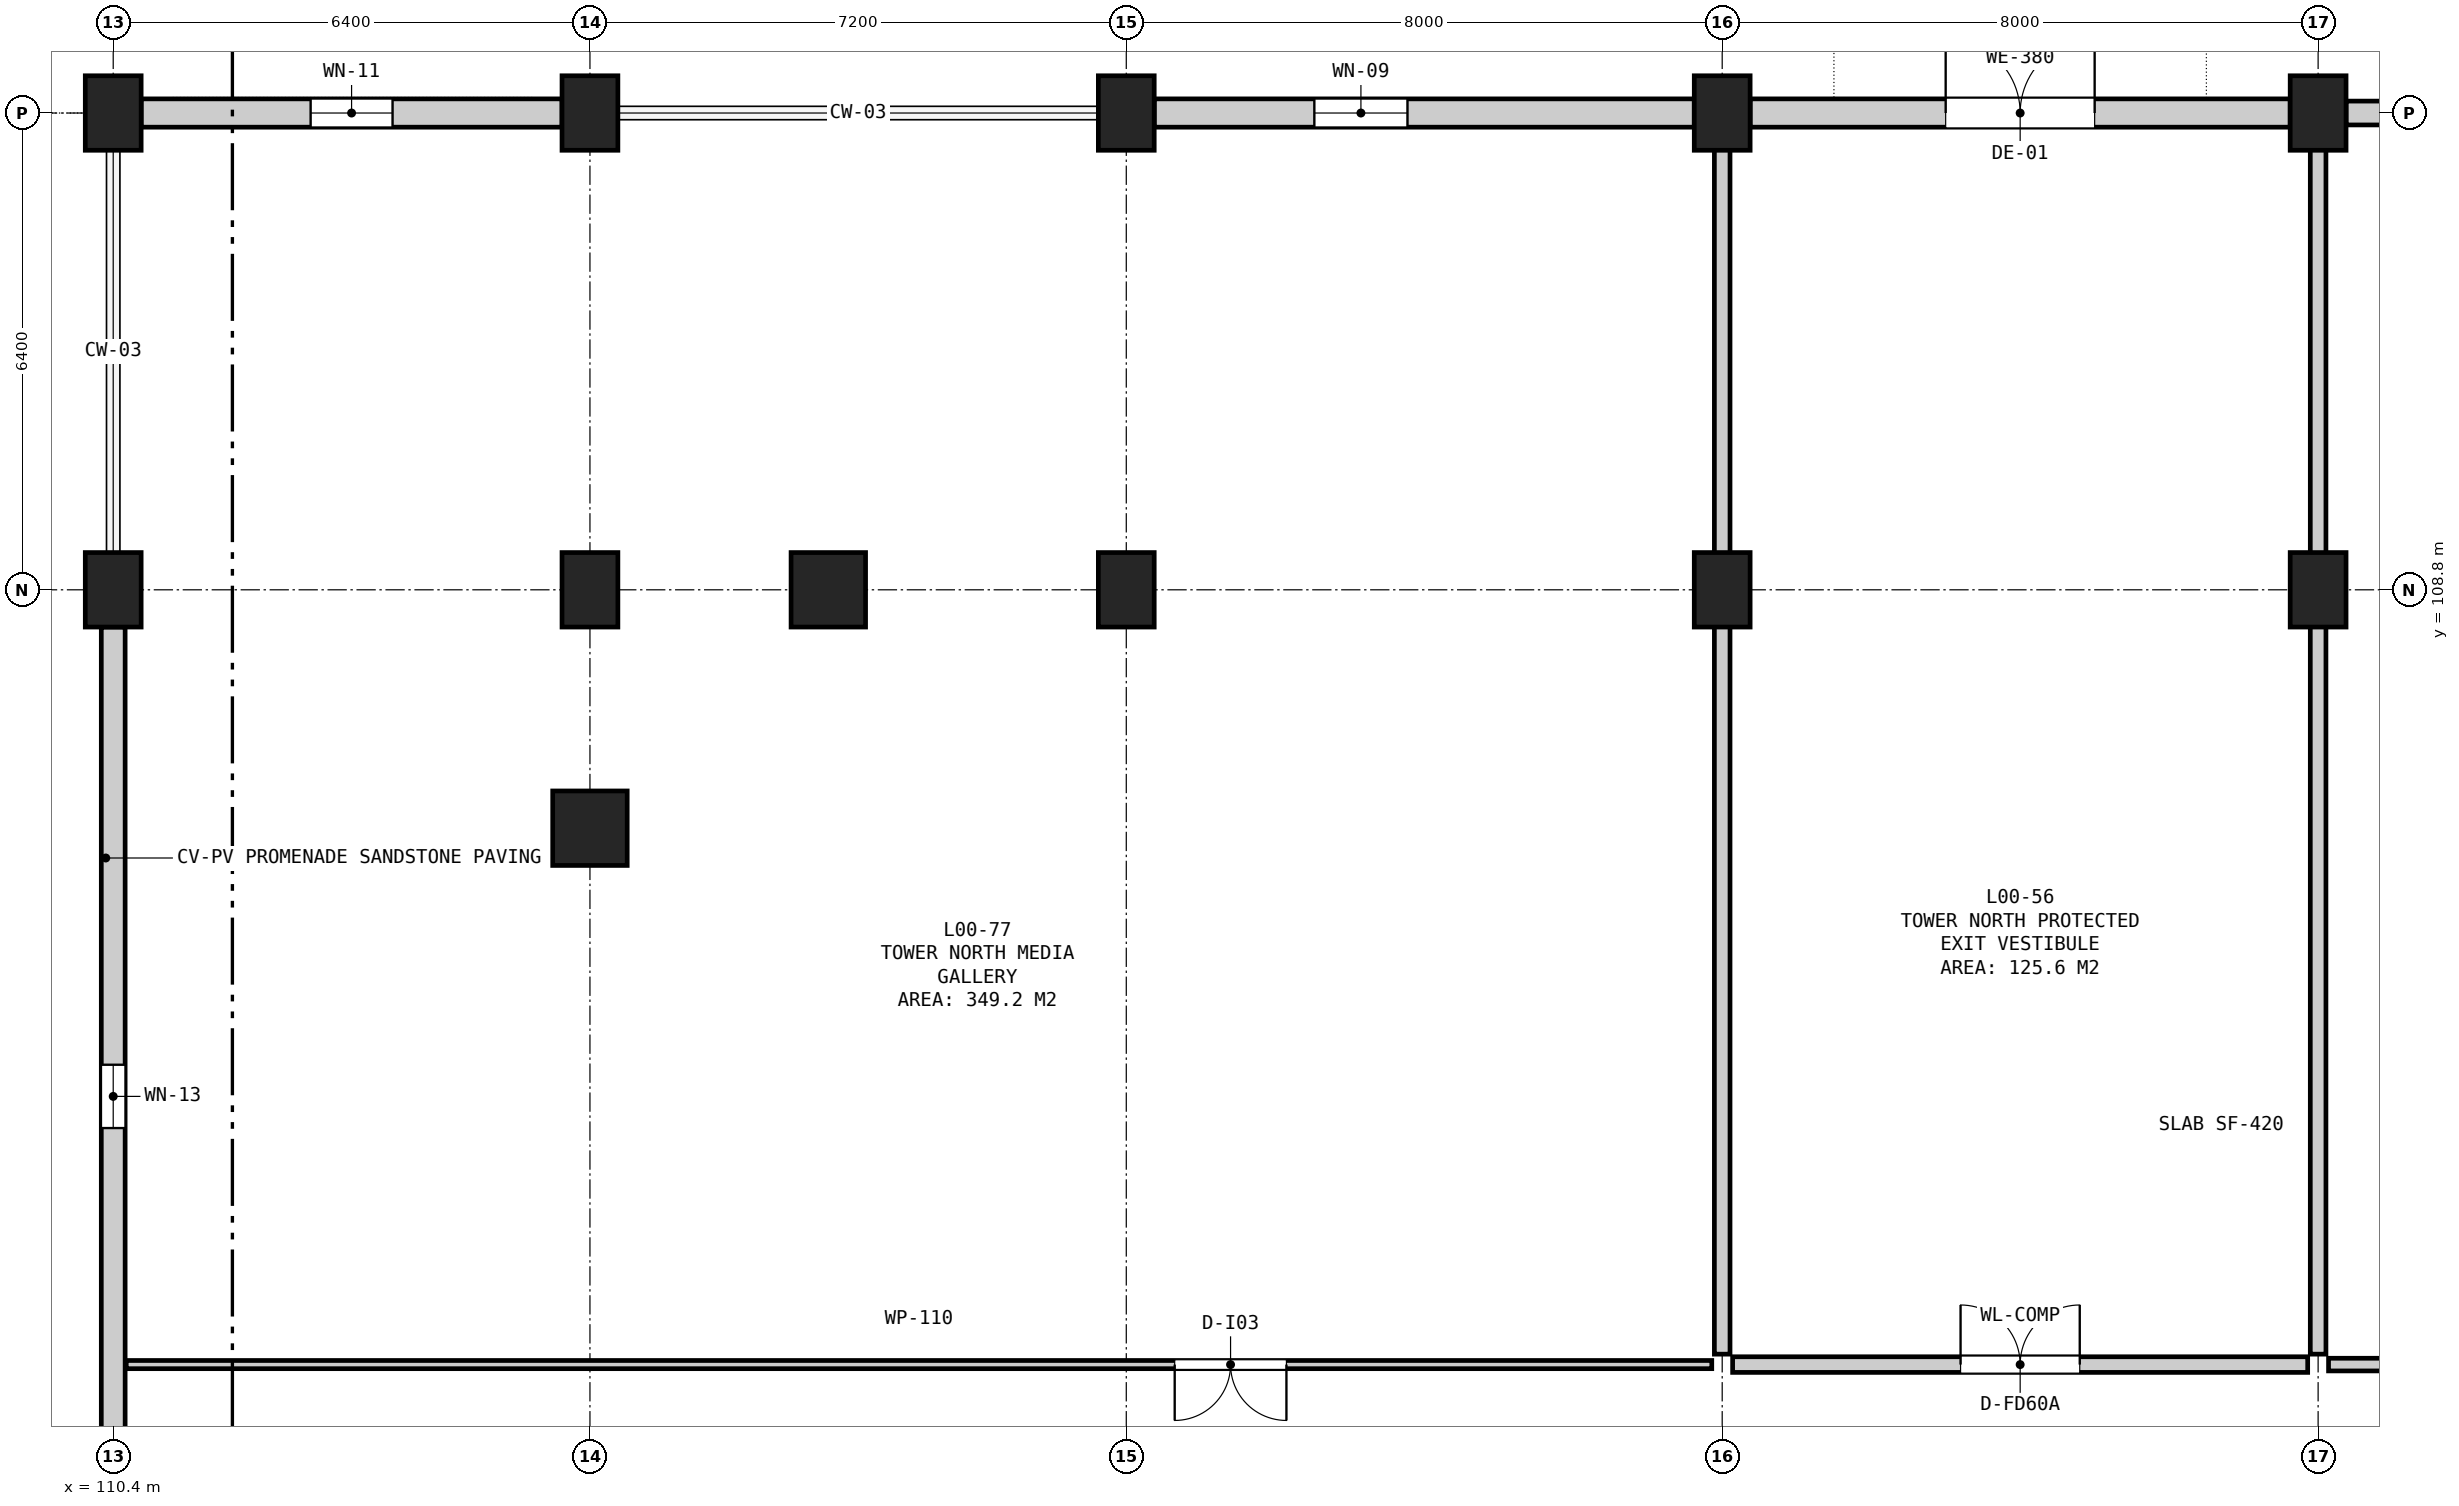
"""IFC4 building model, lengths in metres.
Left out: names, types, materials, properties, quantities, classifications, styles, units other than length and angle.
Written with IfcOpenShell. Run it as: python <this file> out.ifc"""

import sys

from ifc_helpers import new_model, si_unit, direction, frame, frame_2d, origin, origin_2d, place, context, subcontext, project, spatial, rectangle, circle, extrude, element, fill, save


model = new_model("IFC4")
c1 = context("Model", 3, precision=1e-05, world=origin(), true_north=direction((0.0, 1.0)))
c2 = subcontext(c1, "Body", "Model", "MODEL_VIEW")
j1 = project(units=[si_unit("LENGTHUNIT", "METRE"), si_unit("PLANEANGLEUNIT", "RADIAN")], contexts=[c1])
p1 = place(None, origin())
s1 = spatial("IfcSite", under=j1, at=p1, CompositionType="ELEMENT")
p2 = place(p1, origin())
s2 = spatial("IfcBuilding", under=s1, at=p2, CompositionType="ELEMENT")
p3 = place(p2, origin())
s3 = spatial("IfcBuildingStorey", under=s2, at=p3, CompositionType="ELEMENT", Elevation=0.0)
for number, where, z_axis, x_axis in (
    (1, (110.4, 108.8, 0.0), (0.0, 0.0, 1.0), (1.0, 0.0, 0.0)),
    (2, (110.4, 115.2, 0.0), (0.0, 0.0, 1.0), (1.0, 0.0, 0.0)),
):
    element("IfcColumn", number, at=place(p3, frame(where, z_axis=z_axis, x_axis=x_axis)), inside=s3, PredefinedType="COLUMN", context=c2, shape_type="SweptSolid", body=[
        extrude(rectangle(XDim=0.75, YDim=1.0, at=origin_2d()), origin(), (0.0, 0.0, 1.0), 5.4),
    ])
p4 = place(p3, frame((116.8, 105.6, 0.0), z_axis=(0.0, 0.0, 1.0), x_axis=(1.0, 0.0, 0.0)))
e3 = element("IfcColumn", 3, at=p4, inside=s3, PredefinedType="COLUMN", context=c2, shape_type="SweptSolid", body=[
    extrude(circle(Radius=0.5, at=origin_2d()), origin(), (0.0, 0.0, 1.0), 5.4),
])
for number, where, z_axis, x_axis in (
    (4, (116.8, 108.8, 0.0), (0.0, 0.0, 1.0), (1.0, 0.0, 0.0)),
    (5, (116.8, 115.2, 0.0), (0.0, 0.0, 1.0), (1.0, 0.0, 0.0)),
):
    element("IfcColumn", number, at=place(p3, frame(where, z_axis=z_axis, x_axis=x_axis)), inside=s3, PredefinedType="COLUMN", context=c2, shape_type="SweptSolid", body=[
        extrude(rectangle(XDim=0.75, YDim=1.0, at=origin_2d()), origin(), (0.0, 0.0, 1.0), 5.4),
    ])
p5 = place(p3, frame((120.0, 108.8, 0.0), z_axis=(0.0, 0.0, 1.0), x_axis=(1.0, 0.0, 0.0)))
e6 = element("IfcColumn", 6, at=p5, inside=s3, PredefinedType="COLUMN", context=c2, shape_type="SweptSolid", body=[
    extrude(circle(Radius=0.5, at=origin_2d()), origin(), (0.0, 0.0, 1.0), 5.4),
])
for number, where, z_axis, x_axis in (
    (7, (124.0, 108.8, 0.0), (0.0, 0.0, 1.0), (1.0, 0.0, 0.0)),
    (8, (124.0, 115.2, 0.0), (0.0, 0.0, 1.0), (1.0, 0.0, 0.0)),
    (9, (132.0, 108.8, 0.0), (0.0, 0.0, 1.0), (1.0, 0.0, 0.0)),
    (10, (132.0, 115.2, 0.0), (0.0, 0.0, 1.0), (1.0, 0.0, 0.0)),
    (11, (140.0, 108.8, 0.0), (0.0, 0.0, 1.0), (1.0, 0.0, 0.0)),
    (12, (140.0, 115.2, 0.0), (0.0, 0.0, 1.0), (1.0, 0.0, 0.0)),
):
    element("IfcColumn", number, at=place(p3, frame(where, z_axis=z_axis, x_axis=x_axis)), inside=s3, PredefinedType="COLUMN", context=c2, shape_type="SweptSolid", body=[
        extrude(rectangle(XDim=0.75, YDim=1.0, at=origin_2d()), origin(), (0.0, 0.0, 1.0), 5.4),
    ])
p6 = place(p3, frame((147.625, 115.2, 0.0), z_axis=(0.0, 0.0, 1.0), x_axis=(-1.0, 0.0, 0.0)))
e13 = element("IfcWall", 13, at=p6, inside=s3, PredefinedType="SOLIDWALL", context=c2, shape_type="SweptSolid", body=[
    extrude(rectangle(XDim=7.25, YDim=0.32, at=frame_2d((3.625, 0.0))), origin(), (0.0, 0.0, 1.0), 4.48),
])
p7 = place(p6, frame((3.775, 0.0, 0.9)))
e14 = element("IfcOpeningElement", 14, at=p7, cuts=e13, PredefinedType="OPENING", context=c2, shape_type="SweptSolid", body=[
    extrude(rectangle(XDim=1.4, YDim=1.8, at=frame_2d((0.7, 0.9))), frame((0.0, 0.172, 0.0), z_axis=(0.0, -1.0, 0.0), x_axis=(1.0, 0.0, 0.0)), (0.0, 0.0, 1.0), 0.344),
])
p8 = place(p3, frame((139.625, 115.2, 0.0), z_axis=(0.0, 0.0, 1.0), x_axis=(-1.0, 0.0, 0.0)))
e15 = element("IfcWall", 15, at=p8, inside=s3, PredefinedType="SOLIDWALL", context=c2, shape_type="SweptSolid", body=[
    extrude(rectangle(XDim=7.25, YDim=0.38, at=frame_2d((3.625, 0.0))), origin(), (0.0, 0.0, 1.0), 4.465),
])
p9 = place(p8, frame((2.625, 0.0, 0.0)))
e16 = element("IfcOpeningElement", 16, at=p9, cuts=e15, PredefinedType="OPENING", context=c2, shape_type="SweptSolid", body=[
    extrude(rectangle(XDim=2.0, YDim=2.5, at=frame_2d((1.0, 1.25))), frame((0.0, 0.202, 0.0), z_axis=(0.0, -1.0, 0.0), x_axis=(1.0, 0.0, 0.0)), (0.0, 0.0, 1.0), 0.404),
])
p10 = place(p3, frame((131.625, 115.2, 0.0), z_axis=(0.0, 0.0, 1.0), x_axis=(-1.0, 0.0, 0.0)))
e17 = element("IfcWall", 17, at=p10, inside=s3, PredefinedType="SOLIDWALL", context=c2, shape_type="SweptSolid", body=[
    extrude(rectangle(XDim=7.25, YDim=0.38, at=frame_2d((3.625, 0.0))), origin(), (0.0, 0.0, 1.0), 4.48),
])
p11 = place(p10, frame((3.85, 0.0, 0.9)))
e18 = element("IfcOpeningElement", 18, at=p11, cuts=e17, PredefinedType="OPENING", context=c2, shape_type="SweptSolid", body=[
    extrude(rectangle(XDim=1.25, YDim=1.9, at=frame_2d((0.625, 0.95))), frame((0.0, 0.202, 0.0), z_axis=(0.0, -1.0, 0.0), x_axis=(1.0, 0.0, 0.0)), (0.0, 0.0, 1.0), 0.404),
])
p12 = place(p3, frame((116.425, 115.2, 0.0), z_axis=(0.0, 0.0, 1.0), x_axis=(-1.0, 0.0, 0.0)))
e19 = element("IfcWall", 19, at=p12, inside=s3, PredefinedType="SOLIDWALL", context=c2, shape_type="SweptSolid", body=[
    extrude(rectangle(XDim=5.65, YDim=0.38, at=frame_2d((2.825, 0.0))), origin(), (0.0, 0.0, 1.0), 4.48),
])
p13 = place(p12, frame((2.275, 0.0, 0.9)))
e20 = element("IfcOpeningElement", 20, at=p13, cuts=e19, PredefinedType="OPENING", context=c2, shape_type="SweptSolid", body=[
    extrude(rectangle(XDim=1.1, YDim=1.55, at=frame_2d((0.55, 0.775))), frame((0.0, 0.202, 0.0), z_axis=(0.0, -1.0, 0.0), x_axis=(1.0, 0.0, 0.0)), (0.0, 0.0, 1.0), 0.404),
])
p14 = place(p3, frame((110.4, 108.3, 0.0), z_axis=(0.0, 0.0, 1.0), x_axis=(0.0, -1.0, 0.0)))
e21 = element("IfcWall", 21, at=p14, inside=s3, PredefinedType="SOLIDWALL", context=c2, shape_type="SweptSolid", body=[
    extrude(rectangle(XDim=12.6, YDim=0.32, at=frame_2d((6.3, 0.0))), origin(), (0.0, 0.0, 1.0), 4.065),
])
p15 = place(p14, frame((5.875, 0.0, 0.9)))
e22 = element("IfcOpeningElement", 22, at=p15, cuts=e21, PredefinedType="OPENING", context=c2, shape_type="SweptSolid", body=[
    extrude(rectangle(XDim=0.85, YDim=1.35, at=frame_2d((0.425, 0.675))), frame((0.0, 0.172, 0.0), z_axis=(0.0, -1.0, 0.0), x_axis=(1.0, 0.0, 0.0)), (0.0, 0.0, 1.0), 0.344),
])
p16 = place(p3, frame((132.14, 98.4, 0.0), z_axis=(0.0, 0.0, 1.0), x_axis=(1.0, 0.0, 0.0)))
e23 = element("IfcWall", 23, at=p16, inside=s3, PredefinedType="SOLIDWALL", context=c2, shape_type="SweptSolid", body=[
    extrude(rectangle(XDim=7.72, YDim=0.21, at=frame_2d((3.86, 0.0))), origin(), (0.0, 0.0, 1.0), 5.08),
])
p17 = place(p16, frame((3.06, 0.0, 0.0)))
e24 = element("IfcOpeningElement", 24, at=p17, cuts=e23, PredefinedType="OPENING", context=c2, shape_type="SweptSolid", body=[
    extrude(rectangle(XDim=1.6, YDim=2.2, at=frame_2d((0.8, 1.1))), frame((0.0, 0.117, 0.0), z_axis=(0.0, -1.0, 0.0), x_axis=(1.0, 0.0, 0.0)), (0.0, 0.0, 1.0), 0.234),
])
for number, where, z_axis, x_axis in (
    (25, (132.0, 98.54, 0.0), (0.0, 0.0, 1.0), (0.0, 1.0, 0.0)),
    (26, (140.0, 98.54, 0.0), (0.0, 0.0, 1.0), (0.0, 1.0, 0.0)),
):
    element("IfcWall", number, at=place(p3, frame(where, z_axis=z_axis, x_axis=x_axis)), inside=s3, PredefinedType="SOLIDWALL", context=c2, shape_type="SweptSolid", body=[
        extrude(rectangle(XDim=16.555, YDim=0.21, at=frame_2d((8.277, 0.0))), origin(), (0.0, 0.0, 1.0), 4.025),
    ])
p18 = place(p3, frame((110.575, 98.4, 0.0), z_axis=(0.0, 0.0, 1.0), x_axis=(1.0, 0.0, 0.0)))
e27 = element("IfcWall", 27, at=p18, inside=s3, PredefinedType="PARTITIONING", context=c2, shape_type="SweptSolid", body=[
    extrude(rectangle(XDim=21.285, YDim=0.11, at=frame_2d((10.643, 0.0))), origin(), (0.0, 0.0, 1.0), 5.08),
])
p19 = place(p18, frame((14.075, 0.0, 0.0)))
e28 = element("IfcOpeningElement", 28, at=p19, cuts=e27, PredefinedType="OPENING", context=c2, shape_type="SweptSolid", body=[
    extrude(rectangle(XDim=1.5, YDim=2.2, at=frame_2d((0.75, 1.1))), frame((0.0, 0.067, 0.0), z_axis=(0.0, -1.0, 0.0), x_axis=(1.0, 0.0, 0.0)), (0.0, 0.0, 1.0), 0.134),
])
p20 = place(p3, frame((140.14, 98.4, 0.0), z_axis=(0.0, 0.0, 1.0), x_axis=(1.0, 0.0, 0.0)))
e29 = element("IfcWall", 29, at=p20, inside=s3, PredefinedType="PARTITIONING", context=c2, shape_type="SweptSolid", body=[
    extrude(rectangle(XDim=27.685, YDim=0.17, at=frame_2d((13.843, 0.0))), origin(), (0.0, 0.0, 1.0), 5.08),
])
p21 = place(p20, frame((4.86, 0.0, 0.0)))
e30 = element("IfcOpeningElement", 30, at=p21, cuts=e29, PredefinedType="OPENING", context=c2, shape_type="SweptSolid", body=[
    extrude(rectangle(XDim=1.2, YDim=2.15, at=frame_2d((0.6, 1.075))), frame((0.0, 0.097, 0.0), z_axis=(0.0, -1.0, 0.0), x_axis=(1.0, 0.0, 0.0)), (0.0, 0.0, 1.0), 0.194),
])
p22 = place(p9, frame((2.0, 0.0, 0.0), z_axis=(0.0, 0.0, 1.0), x_axis=(-1.0, 0.0, 0.0)))
e31 = element("IfcDoor", 31, at=p22, inside=s3, OperationType="DOUBLE_DOOR_SINGLE_SWING", PredefinedType="DOOR", context=c2, shape_type="SweptSolid", body=[
    extrude(rectangle(XDim=2.0, YDim=2.5, at=frame_2d((1.0, 1.25))), frame((0.0, 0.025, 0.0), z_axis=(0.0, -1.0, 0.0), x_axis=(1.0, 0.0, 0.0)), (0.0, 0.0, 1.0), 0.05),
])
fill(e16, e31)
p23 = place(p11, origin())
e32 = element("IfcWindow", 32, at=p23, inside=s3, PartitioningType="SINGLE_PANEL", PredefinedType="WINDOW", context=c2, shape_type="SweptSolid", body=[
    extrude(rectangle(XDim=1.25, YDim=1.9, at=frame_2d((0.625, 0.95))), frame((0.0, 0.03, 0.0), z_axis=(0.0, -1.0, 0.0), x_axis=(1.0, 0.0, 0.0)), (0.0, 0.0, 1.0), 0.06),
])
fill(e18, e32)
p24 = place(p13, origin())
e33 = element("IfcWindow", 33, at=p24, inside=s3, PartitioningType="SINGLE_PANEL", PredefinedType="WINDOW", context=c2, shape_type="SweptSolid", body=[
    extrude(rectangle(XDim=1.1, YDim=1.55, at=frame_2d((0.55, 0.775))), frame((0.0, 0.03, 0.0), z_axis=(0.0, -1.0, 0.0), x_axis=(1.0, 0.0, 0.0)), (0.0, 0.0, 1.0), 0.06),
])
fill(e20, e33)
p25 = place(p15, origin())
e34 = element("IfcWindow", 34, at=p25, inside=s3, PartitioningType="SINGLE_PANEL", PredefinedType="WINDOW", context=c2, shape_type="SweptSolid", body=[
    extrude(rectangle(XDim=0.85, YDim=1.35, at=frame_2d((0.425, 0.675))), frame((0.0, 0.03, 0.0), z_axis=(0.0, -1.0, 0.0), x_axis=(1.0, 0.0, 0.0)), (0.0, 0.0, 1.0), 0.06),
])
fill(e22, e34)
p26 = place(p17, origin())
e35 = element("IfcDoor", 35, at=p26, inside=s3, OperationType="DOUBLE_DOOR_SINGLE_SWING", PredefinedType="DOOR", context=c2, shape_type="SweptSolid", body=[
    extrude(rectangle(XDim=1.6, YDim=2.2, at=frame_2d((0.8, 1.1))), frame((0.0, 0.025, 0.0), z_axis=(0.0, -1.0, 0.0), x_axis=(1.0, 0.0, 0.0)), (0.0, 0.0, 1.0), 0.05),
])
fill(e24, e35)
p27 = place(p19, frame((1.5, 0.0, 0.0), z_axis=(0.0, 0.0, 1.0), x_axis=(-1.0, 0.0, 0.0)))
e36 = element("IfcDoor", 36, at=p27, inside=s3, OperationType="DOUBLE_DOOR_SINGLE_SWING", PredefinedType="DOOR", context=c2, shape_type="SweptSolid", body=[
    extrude(rectangle(XDim=1.5, YDim=2.2, at=frame_2d((0.75, 1.1))), frame((0.0, 0.025, 0.0), z_axis=(0.0, -1.0, 0.0), x_axis=(1.0, 0.0, 0.0)), (0.0, 0.0, 1.0), 0.05),
])
fill(e28, e36)
save(model, sys.argv[1])
